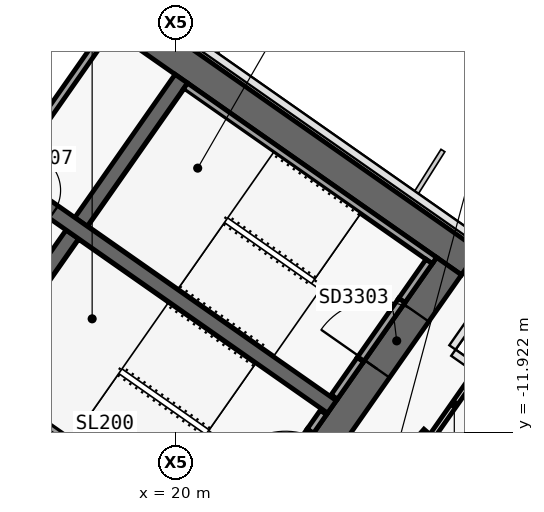
"""IFC4 building model, lengths in metres.
Left out: names, types, materials, properties, quantities, classifications, styles, units other than length and angle.
Written with IfcOpenShell. Run it as: python <this file> out.ifc"""

import sys

from ifc_helpers import new_model, si_unit, direction, frame, frame_2d, origin, place, context, subcontext, project, spatial, polyline, rectangle, outline, extrude, element, fill, save


model = new_model("IFC4")
c1 = context("Model", 3, precision=1e-05, world=origin(), true_north=direction((0.0, 1.0)))
c2 = subcontext(c1, "Body", "Model", "MODEL_VIEW")
j1 = project(units=[si_unit("LENGTHUNIT", "METRE"), si_unit("PLANEANGLEUNIT", "RADIAN")], contexts=[c1])
p1 = place(None, origin())
s1 = spatial("IfcSite", under=j1, at=p1, CompositionType="ELEMENT")
p2 = place(p1, origin())
s2 = spatial("IfcBuilding", under=s1, at=p2, CompositionType="ELEMENT")
p3 = place(p2, frame((0.0, 0.0, 186.6)))
s3 = spatial("IfcBuildingStorey", under=s2, at=p3, CompositionType="ELEMENT", Elevation=186.6)
p4 = place(p3, frame((-0.029, 11.984, 0.0), z_axis=(0.0, 0.0, 1.0), x_axis=(0.819151382952, -0.573577380837, 0.0)))
e1 = element("IfcWall", 1, at=p4, inside=s3, PredefinedType="SHEAR", context=c2, shape_type="SweptSolid", body=[
    extrude(outline(polyline([(33.898, 0.4), (-0.0, 0.4), (0.56, -0.4), (33.898, -0.4), (33.898, 0.4)])), origin(), (0.0, 0.0, 1.0), 3.9),
])
p5 = place(p3, frame((-0.029, -0.712, 0.0), z_axis=(0.0, 0.0, 1.0), x_axis=(0.819151758019, -0.573576845187, 0.0)))
e2 = element("IfcWall", 2, at=p5, inside=s3, PredefinedType="SHEAR", context=c2, shape_type="SweptSolid", body=[
    extrude(outline(polyline([(26.616, 0.4), (-0.0, 0.4), (0.56, -0.4), (26.616, -0.4), (26.616, 0.4)])), origin(), (0.0, 0.0, 1.0), 3.9),
])
p6 = place(p5, frame((1.166, 0.0, 0.0)))
e3 = element("IfcOpeningElement", 3, at=p6, cuts=e2, PredefinedType="OPENING", context=c2, shape_type="SweptSolid", body=[
    extrude(rectangle(XDim=1.5, YDim=2.1, at=frame_2d((0.75, 1.05))), frame((0.0, 0.41, 0.0), z_axis=(0.0, -1.0, 0.0), x_axis=(1.0, 0.0, 0.0)), (0.0, 0.0, 1.0), 0.82),
])
p7 = place(p5, frame((12.366, 0.0, 0.0)))
e4 = element("IfcOpeningElement", 4, at=p7, cuts=e2, PredefinedType="OPENING", context=c2, shape_type="SweptSolid", body=[
    extrude(rectangle(XDim=1.5, YDim=2.1, at=frame_2d((0.75, 1.05))), frame((0.0, 0.41, 0.0), z_axis=(0.0, -1.0, 0.0), x_axis=(1.0, 0.0, 0.0)), (0.0, 0.0, 1.0), 0.82),
])
p8 = place(p3, frame((21.675, -15.421, 0.0), z_axis=(0.0, 0.0, 1.0), x_axis=(0.573581815061, 0.819148278049, 0.0)))
e5 = element("IfcWall", 5, at=p8, inside=s3, PredefinedType="SHEAR", context=c2, shape_type="SweptSolid", body=[
    extrude(outline(polyline([(9.6, 0.4), (0.0, 0.4), (0.0, -0.4), (9.6, -0.4), (9.6, 0.4)])), origin(), (0.0, 0.0, 1.0), 3.9),
])
p9 = place(p8, frame((6.3, 0.0, 0.0)))
e6 = element("IfcOpeningElement", 6, at=p9, cuts=e5, PredefinedType="OPENING", context=c2, shape_type="SweptSolid", body=[
    extrude(rectangle(XDim=1.8, YDim=2.1, at=frame_2d((0.9, 1.05))), frame((0.0, 0.41, 0.0), z_axis=(0.0, -1.0, 0.0), x_axis=(1.0, 0.0, 0.0)), (0.0, 0.0, 1.0), 0.82),
])
p10 = place(p8, frame((2.1, 0.0, 0.0)))
e7 = element("IfcOpeningElement", 7, at=p10, cuts=e5, PredefinedType="OPENING", context=c2, shape_type="SweptSolid", body=[
    extrude(rectangle(XDim=1.8, YDim=2.1, at=frame_2d((0.9, 1.05))), frame((0.0, 0.41, 0.0), z_axis=(0.0, -1.0, 0.0), x_axis=(1.0, 0.0, 0.0)), (0.0, 0.0, 1.0), 0.82),
])
p11 = place(p3, frame((14.63, -10.488, 0.0), z_axis=(0.0, 0.0, 1.0), x_axis=(0.573611936273, 0.819127185829, 0.0)))
e8 = element("IfcWall", 8, at=p11, inside=s3, PredefinedType="SHEAR", context=c2, shape_type="SweptSolid", body=[
    extrude(outline(polyline([(0.0, 0.2), (0.0, -0.2), (4.6, -0.2), (4.6, 0.2), (0.0, 0.2)])), origin(), (0.0, 0.0, 1.0), 3.9),
])
p12 = place(p3, frame((17.498, -6.392, 0.0), z_axis=(0.0, 0.0, 1.0), x_axis=(0.573611936273, 0.819127185829, 0.0)))
e9 = element("IfcWall", 9, at=p12, inside=s3, PredefinedType="SHEAR", context=c2, shape_type="SweptSolid", body=[
    extrude(outline(polyline([(4.6, -0.2), (4.6, 0.2), (0.0, 0.2), (0.0, -0.2), (4.6, -0.2)])), origin(), (0.0, 0.0, 1.0), 3.9),
])
p13 = place(p3, frame((2.638, 3.768, 0.0), z_axis=(0.0, 0.0, 1.0), x_axis=(0.81915267502, -0.573575535572, 0.0)))
e10 = element("IfcWall", 10, at=p13, inside=s3, PredefinedType="SHEAR", context=c2, shape_type="SweptSolid", body=[
    extrude(outline(polyline([(0.0, 0.2), (0.0, -0.2), (26.2, -0.2), (26.2, 0.2), (0.0, 0.2)])), origin(), (0.0, 0.0, 1.0), 3.9),
])
p14 = place(p13, frame((9.637, 0.0, 0.0)))
e11 = element("IfcOpeningElement", 11, at=p14, cuts=e10, PredefinedType="OPENING", context=c2, shape_type="SweptSolid", body=[
    extrude(rectangle(XDim=1.2, YDim=2.1, at=frame_2d((0.6, 1.05))), frame((0.0, 0.21, 0.0), z_axis=(0.0, -1.0, 0.0), x_axis=(1.0, 0.0, 0.0)), (0.0, 0.0, 1.0), 0.42),
])
p15 = place(p13, frame((11.812, 0.0, 0.0)))
e12 = element("IfcOpeningElement", 12, at=p15, cuts=e10, PredefinedType="OPENING", context=c2, shape_type="SweptSolid", body=[
    extrude(rectangle(XDim=1.2, YDim=2.1, at=frame_2d((0.6, 1.05))), frame((0.0, 0.21, 0.0), z_axis=(0.0, -1.0, 0.0), x_axis=(1.0, 0.0, 0.0)), (0.0, 0.0, 1.0), 0.42),
])
p16 = place(p13, frame((13.988, 0.0, 0.0)))
e13 = element("IfcOpeningElement", 13, at=p16, cuts=e10, PredefinedType="OPENING", context=c2, shape_type="SweptSolid", body=[
    extrude(rectangle(XDim=1.2, YDim=2.1, at=frame_2d((0.6, 1.05))), frame((0.0, 0.21, 0.0), z_axis=(0.0, -1.0, 0.0), x_axis=(1.0, 0.0, 0.0)), (0.0, 0.0, 1.0), 0.42),
])
p17 = place(p13, frame((16.262, 0.0, 0.0)))
e14 = element("IfcOpeningElement", 14, at=p17, cuts=e10, PredefinedType="OPENING", context=c2, shape_type="SweptSolid", body=[
    extrude(rectangle(XDim=1.0, YDim=2.1, at=frame_2d((0.5, 1.05))), frame((0.0, 0.21, 0.0), z_axis=(0.0, -1.0, 0.0), x_axis=(1.0, 0.0, 0.0)), (0.0, 0.0, 1.0), 0.42),
])
p18 = place(p3, frame((15.594, -5.059, 0.0), z_axis=(0.0, 0.0, 1.0), x_axis=(0.573540709186, 0.819177059558, 0.0)))
e15 = element("IfcWall", 15, at=p18, inside=s3, PredefinedType="SOLIDWALL", context=c2, shape_type="SweptSolid", body=[
    extrude(rectangle(XDim=4.6, YDim=0.2, at=frame_2d((2.3, 0.0))), origin(), (0.0, 0.0, 1.0), 3.9),
])
p19 = place(p3, frame((20.243, -2.821, 0.0), z_axis=(0.0, 0.0, 1.0), x_axis=(0.819141584393, -0.57359137434, 0.0)))
e16 = element("IfcWall", 16, at=p19, inside=s3, PredefinedType="SOLIDWALL", context=c2, shape_type="SweptSolid", body=[
    extrude(rectangle(XDim=8.0, YDim=0.2, at=frame_2d((4.0, 0.0))), origin(), (0.0, 0.0, 1.0), 3.62),
])
p20 = place(p3, frame((24.162, -10.998, 0.0), z_axis=(0.0, 0.0, 1.0), x_axis=(0.573612502218, 0.819126789514, 0.0)))
e17 = element("IfcWall", 17, at=p20, inside=s3, PredefinedType="SOLIDWALL", context=c2, shape_type="SweptSolid", body=[
    extrude(rectangle(XDim=1.2, YDim=0.2, at=frame_2d((0.6, 0.0))), origin(), (0.0, 0.0, 1.0), 3.62),
])
p21 = place(p3, frame((25.94, -8.458, 0.0), z_axis=(0.0, 0.0, 1.0), x_axis=(0.573619628835, 0.819121798889, 0.0)))
e18 = element("IfcWall", 18, at=p21, inside=s3, PredefinedType="SOLIDWALL", context=c2, shape_type="SweptSolid", body=[
    extrude(rectangle(XDim=1.25, YDim=0.2, at=frame_2d((0.625, 0.0))), origin(), (0.0, 0.0, 1.0), 3.62),
])
p22 = place(p3, frame((24.85, -10.014, 2.15), z_axis=(0.0, 0.0, 1.0), x_axis=(0.573505465124, 0.819201734296, 0.0)))
e19 = element("IfcWall", 19, at=p22, inside=s3, PredefinedType="SOLIDWALL", context=c2, shape_type="SweptSolid", body=[
    extrude(rectangle(XDim=1.9, YDim=0.2, at=frame_2d((0.95, 0.0))), origin(), (0.0, 0.0, 1.0), 1.47),
])
p23 = place(p3, frame((14.851, -10.521, 0.0), z_axis=(0.0, 0.0, 1.0), x_axis=(0.819141584393, -0.57359137434, 0.0)))
e20 = element("IfcWall", 20, at=p23, inside=s3, PredefinedType="SOLIDWALL", context=c2, shape_type="SweptSolid", body=[
    extrude(rectangle(XDim=8.0, YDim=0.2, at=frame_2d((4.0, 0.0))), origin(), (0.0, 0.0, 1.0), 3.62),
])
p24 = place(p3, frame((23.531, -11.898, 0.0), z_axis=(0.0, 0.0, 1.0), x_axis=(0.573708088123, 0.819059844958, 0.0)))
e21 = element("IfcWall", 21, at=p24, inside=s3, PredefinedType="SOLIDWALL", context=c2, shape_type="SweptSolid", body=[
    extrude(rectangle(XDim=0.6, YDim=0.2, at=frame_2d((0.3, 0.0))), origin(), (0.0, 0.0, 1.0), 3.62),
])
p25 = place(p3, frame((22.441, -13.455, 2.15), z_axis=(0.0, 0.0, 1.0), x_axis=(0.573591692345, 0.819141361715, 0.0)))
e22 = element("IfcWall", 22, at=p25, inside=s3, PredefinedType="SOLIDWALL", context=c2, shape_type="SweptSolid", body=[
    extrude(rectangle(XDim=1.9, YDim=0.2, at=frame_2d((0.95, 0.0))), origin(), (0.0, 0.0, 1.0), 1.47),
])
p26 = place(p3, frame((28.876, -11.064, 0.0), z_axis=(0.0, 0.0, 1.0), x_axis=(-0.573591492816, -0.819141501433, 0.0)))
e23 = element("IfcWall", 23, at=p26, inside=s3, PredefinedType="PARTITIONING", context=c2, shape_type="SweptSolid", body=[
    extrude(rectangle(XDim=8.5, YDim=0.15, at=frame_2d((4.25, 0.0))), origin(), (0.0, 0.0, 1.0), 3.0),
])
p27 = place(p3, frame((22.285, -16.825, 0.0), z_axis=(0.0, 0.0, 1.0), x_axis=(0.656781429942, 0.754080999153, 0.0)))
e24 = element("IfcWall", 24, at=p27, inside=s3, PredefinedType="PARTITIONING", context=c2, shape_type="SweptSolid", body=[
    extrude(rectangle(XDim=6.536, YDim=0.15, at=frame_2d((3.268, 0.0))), origin(), (0.0, 0.0, 1.0), 3.62),
])
p28 = place(p3, frame((26.746, -12.014, 0.0), z_axis=(0.0, 0.0, 1.0), x_axis=(0.573568836472, 0.819157365729, 0.0)))
e25 = element("IfcWall", 25, at=p28, inside=s3, PredefinedType="PARTITIONING", context=c2, shape_type="SweptSolid", body=[
    extrude(rectangle(XDim=2.0, YDim=0.15, at=frame_2d((1.0, 0.0))), origin(), (0.0, 0.0, 1.0), 3.0),
])
p29 = place(p17, origin())
e26 = element("IfcDoor", 26, at=p29, inside=s3, OperationType="SINGLE_SWING_RIGHT", PredefinedType="DOOR", context=c2, shape_type="SweptSolid", body=[
    extrude(rectangle(XDim=1.0, YDim=2.1, at=frame_2d((0.5, 1.05))), frame((0.0, 0.025, 0.0), z_axis=(0.0, -1.0, 0.0), x_axis=(1.0, 0.0, 0.0)), (0.0, 0.0, 1.0), 0.05),
])
fill(e14, e26)
p30 = place(p9, origin())
e27 = element("IfcDoor", 27, at=p30, inside=s3, OperationType="DOUBLE_DOOR_SINGLE_SWING", PredefinedType="DOOR", context=c2, shape_type="SweptSolid", body=[
    extrude(rectangle(XDim=1.8, YDim=2.1, at=frame_2d((0.9, 1.05))), frame((0.0, 0.025, 0.0), z_axis=(0.0, -1.0, 0.0), x_axis=(1.0, 0.0, 0.0)), (0.0, 0.0, 1.0), 0.05),
])
fill(e6, e27)
save(model, sys.argv[1])
